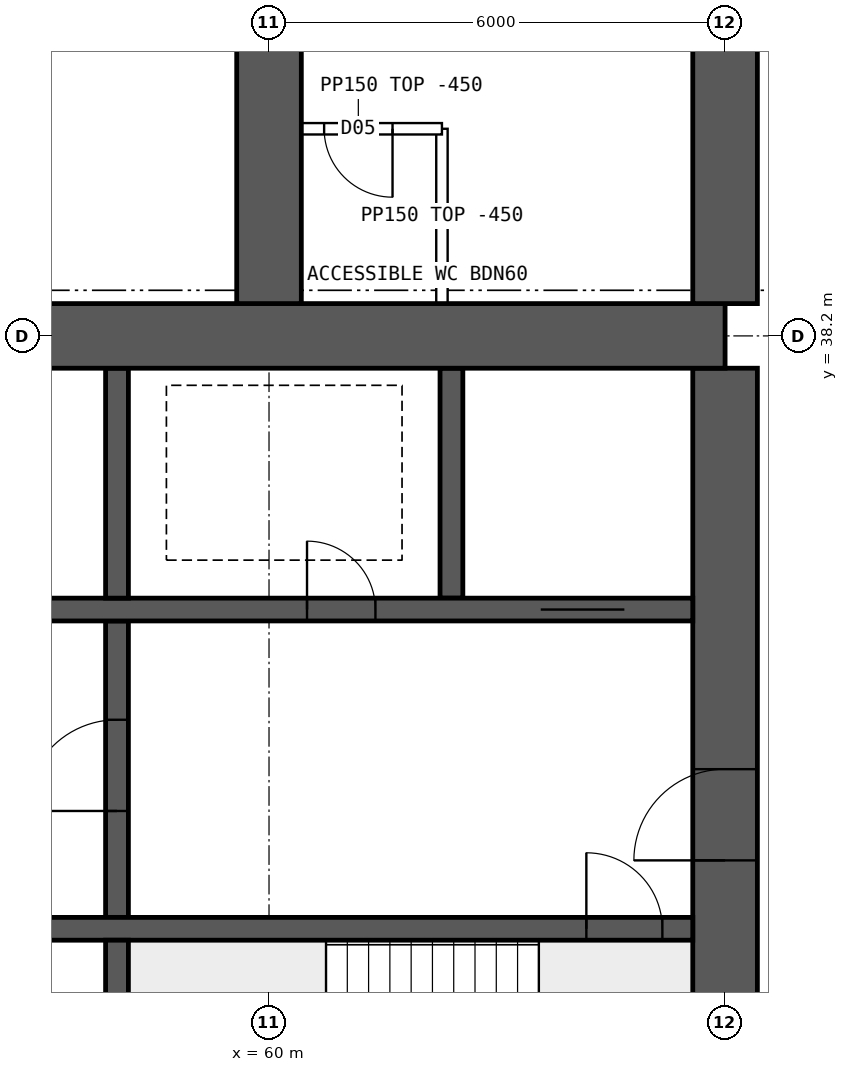
"""IFC4 building model, lengths in metres.
Left out: names, types, materials, properties, quantities, classifications, styles, units other than length and angle.
Written with IfcOpenShell. Run it as: python <this file> out.ifc"""

import sys

from ifc_helpers import new_model, si_unit, direction, frame, frame_2d, origin, place, context, subcontext, project, spatial, rectangle, extrude, element, fill, save


model = new_model("IFC4")
c1 = context("Model", 3, precision=1e-05, world=origin(), true_north=direction((0.0, 1.0)))
c2 = subcontext(c1, "Body", "Model", "MODEL_VIEW")
j1 = project(units=[si_unit("LENGTHUNIT", "METRE"), si_unit("PLANEANGLEUNIT", "RADIAN")], contexts=[c1])
p1 = place(None, origin())
s1 = spatial("IfcSite", under=j1, at=p1, CompositionType="ELEMENT")
p2 = place(p1, origin())
s2 = spatial("IfcBuilding", under=s1, at=p2, CompositionType="ELEMENT")
p3 = place(p2, frame((0.0, 0.0, 174.85)))
s3 = spatial("IfcBuildingStorey", under=s2, at=p3, CompositionType="ELEMENT", Elevation=174.85)
p4 = place(p3, frame((18.0, 38.2, 0.0), z_axis=(0.0, 0.0, 1.0), x_axis=(1.0, 0.0, 0.0)))
e1 = element("IfcWall", 1, at=p4, inside=s3, PredefinedType="SHEAR", context=c2, shape_type="SweptSolid", body=[
    extrude(rectangle(XDim=48.0, YDim=0.85, at=frame_2d((24.0, 0.0))), origin(), (0.0, 0.0, 1.0), 3.75),
])
p5 = place(p3, frame((66.0, 26.225, 0.0), z_axis=(0.0, 0.0, 1.0), x_axis=(0.0, 1.0, 0.0)))
e2 = element("IfcWall", 2, at=p5, inside=s3, PredefinedType="SHEAR", context=c2, shape_type="SweptSolid", body=[
    extrude(rectangle(XDim=11.55, YDim=0.85, at=frame_2d((5.775, 0.0))), origin(), (0.0, 0.0, 1.0), 3.75),
])
p6 = place(p5, frame((5.075, 0.0, 0.0)))
e3 = element("IfcOpeningElement", 3, at=p6, cuts=e2, PredefinedType="OPENING", context=c2, shape_type="SweptSolid", body=[
    extrude(rectangle(XDim=1.2, YDim=2.1, at=frame_2d((0.6, 1.05))), frame((0.0, 0.435, 0.0), z_axis=(0.0, -1.0, 0.0), x_axis=(1.0, 0.0, 0.0)), (0.0, 0.0, 1.0), 0.87),
])
p7 = place(p3, frame((18.425, 30.4, 0.0), z_axis=(0.0, 0.0, 1.0), x_axis=(1.0, 0.0, 0.0)))
e4 = element("IfcWall", 4, at=p7, inside=s3, PredefinedType="SHEAR", context=c2, shape_type="SweptSolid", body=[
    extrude(rectangle(XDim=47.15, YDim=0.3, at=frame_2d((23.575, 0.0))), origin(), (0.0, 0.0, 1.0), 3.75),
])
p8 = place(p7, frame((0.4, 0.0, 0.0)))
e5 = element("IfcOpeningElement", 5, at=p8, cuts=e4, PredefinedType="OPENING", context=c2, shape_type="SweptSolid", body=[
    extrude(rectangle(XDim=1.0, YDim=2.1, at=frame_2d((0.5, 1.05))), frame((0.0, 0.16, 0.0), z_axis=(0.0, -1.0, 0.0), x_axis=(1.0, 0.0, 0.0)), (0.0, 0.0, 1.0), 0.32),
])
p9 = place(p7, frame((45.75, 0.0, 0.0)))
e6 = element("IfcOpeningElement", 6, at=p9, cuts=e4, PredefinedType="OPENING", context=c2, shape_type="SweptSolid", body=[
    extrude(rectangle(XDim=1.0, YDim=2.1, at=frame_2d((0.5, 1.05))), frame((0.0, 0.16, 0.0), z_axis=(0.0, -1.0, 0.0), x_axis=(1.0, 0.0, 0.0)), (0.0, 0.0, 1.0), 0.32),
])
p10 = place(p7, frame((8.325, 0.0, 0.0)))
e7 = element("IfcOpeningElement", 7, at=p10, cuts=e4, PredefinedType="OPENING", context=c2, shape_type="SweptSolid", body=[
    extrude(rectangle(XDim=1.1, YDim=2.1, at=frame_2d((0.55, 1.05))), frame((0.0, 0.16, 0.0), z_axis=(0.0, -1.0, 0.0), x_axis=(1.0, 0.0, 0.0)), (0.0, 0.0, 1.0), 0.32),
])
p11 = place(p7, frame((10.925, 0.0, 0.0)))
e8 = element("IfcOpeningElement", 8, at=p11, cuts=e4, PredefinedType="OPENING", context=c2, shape_type="SweptSolid", body=[
    extrude(rectangle(XDim=1.1, YDim=2.1, at=frame_2d((0.55, 1.05))), frame((0.0, 0.16, 0.0), z_axis=(0.0, -1.0, 0.0), x_axis=(1.0, 0.0, 0.0)), (0.0, 0.0, 1.0), 0.32),
])
p12 = place(p7, frame((13.525, 0.0, 0.0)))
e9 = element("IfcOpeningElement", 9, at=p12, cuts=e4, PredefinedType="OPENING", context=c2, shape_type="SweptSolid", body=[
    extrude(rectangle(XDim=1.1, YDim=2.1, at=frame_2d((0.55, 1.05))), frame((0.0, 0.16, 0.0), z_axis=(0.0, -1.0, 0.0), x_axis=(1.0, 0.0, 0.0)), (0.0, 0.0, 1.0), 0.32),
])
p13 = place(p7, frame((16.125, 0.0, 0.0)))
e10 = element("IfcOpeningElement", 10, at=p13, cuts=e4, PredefinedType="OPENING", context=c2, shape_type="SweptSolid", body=[
    extrude(rectangle(XDim=1.1, YDim=2.1, at=frame_2d((0.55, 1.05))), frame((0.0, 0.16, 0.0), z_axis=(0.0, -1.0, 0.0), x_axis=(1.0, 0.0, 0.0)), (0.0, 0.0, 1.0), 0.32),
])
p14 = place(p7, frame((18.9, 0.0, 0.0)))
e11 = element("IfcOpeningElement", 11, at=p14, cuts=e4, PredefinedType="OPENING", context=c2, shape_type="SweptSolid", body=[
    extrude(rectangle(XDim=0.9, YDim=2.1, at=frame_2d((0.45, 1.05))), frame((0.0, 0.16, 0.0), z_axis=(0.0, -1.0, 0.0), x_axis=(1.0, 0.0, 0.0)), (0.0, 0.0, 1.0), 0.32),
])
p15 = place(p7, frame((30.192, 0.0, 0.0)))
e12 = element("IfcOpeningElement", 12, at=p15, cuts=e4, PredefinedType="OPENING", context=c2, shape_type="SweptSolid", body=[
    extrude(rectangle(XDim=1.1, YDim=2.1, at=frame_2d((0.55, 1.05))), frame((0.0, 0.16, 0.0), z_axis=(0.0, -1.0, 0.0), x_axis=(1.0, 0.0, 0.0)), (0.0, 0.0, 1.0), 0.32),
])
p16 = place(p7, frame((33.725, 0.0, 0.0)))
e13 = element("IfcOpeningElement", 13, at=p16, cuts=e4, PredefinedType="OPENING", context=c2, shape_type="SweptSolid", body=[
    extrude(rectangle(XDim=1.1, YDim=2.1, at=frame_2d((0.55, 1.05))), frame((0.0, 0.16, 0.0), z_axis=(0.0, -1.0, 0.0), x_axis=(1.0, 0.0, 0.0)), (0.0, 0.0, 1.0), 0.32),
])
p17 = place(p7, frame((37.258, 0.0, 0.0)))
e14 = element("IfcOpeningElement", 14, at=p17, cuts=e4, PredefinedType="OPENING", context=c2, shape_type="SweptSolid", body=[
    extrude(rectangle(XDim=1.1, YDim=2.1, at=frame_2d((0.55, 1.05))), frame((0.0, 0.16, 0.0), z_axis=(0.0, -1.0, 0.0), x_axis=(1.0, 0.0, 0.0)), (0.0, 0.0, 1.0), 0.32),
])
p18 = place(p3, frame((18.425, 34.6, 0.0), z_axis=(0.0, 0.0, 1.0), x_axis=(1.0, 0.0, 0.0)))
e15 = element("IfcWall", 15, at=p18, inside=s3, PredefinedType="SHEAR", context=c2, shape_type="SweptSolid", body=[
    extrude(rectangle(XDim=47.15, YDim=0.3, at=frame_2d((23.575, 0.0))), origin(), (0.0, 0.0, 1.0), 3.75),
])
p19 = place(p18, frame((0.9, 0.0, 0.0)))
e16 = element("IfcOpeningElement", 16, at=p19, cuts=e15, PredefinedType="OPENING", context=c2, shape_type="SweptSolid", body=[
    extrude(rectangle(XDim=1.1, YDim=2.1, at=frame_2d((0.55, 1.05))), frame((0.0, 0.16, 0.0), z_axis=(0.0, -1.0, 0.0), x_axis=(1.0, 0.0, 0.0)), (0.0, 0.0, 1.0), 0.32),
])
p20 = place(p18, frame((45.15, 0.0, 0.0)))
e17 = element("IfcOpeningElement", 17, at=p20, cuts=e15, PredefinedType="OPENING", context=c2, shape_type="SweptSolid", body=[
    extrude(rectangle(XDim=1.1, YDim=2.1, at=frame_2d((0.55, 1.05))), frame((0.0, 0.16, 0.0), z_axis=(0.0, -1.0, 0.0), x_axis=(1.0, 0.0, 0.0)), (0.0, 0.0, 1.0), 0.32),
])
p21 = place(p18, frame((4.175, 0.0, 0.0)))
e18 = element("IfcOpeningElement", 18, at=p21, cuts=e15, PredefinedType="OPENING", context=c2, shape_type="SweptSolid", body=[
    extrude(rectangle(XDim=0.9, YDim=2.1, at=frame_2d((0.45, 1.05))), frame((0.0, 0.16, 0.0), z_axis=(0.0, -1.0, 0.0), x_axis=(1.0, 0.0, 0.0)), (0.0, 0.0, 1.0), 0.32),
])
p22 = place(p18, frame((42.075, 0.0, 0.0)))
e19 = element("IfcOpeningElement", 19, at=p22, cuts=e15, PredefinedType="OPENING", context=c2, shape_type="SweptSolid", body=[
    extrude(rectangle(XDim=0.9, YDim=2.1, at=frame_2d((0.45, 1.05))), frame((0.0, 0.16, 0.0), z_axis=(0.0, -1.0, 0.0), x_axis=(1.0, 0.0, 0.0)), (0.0, 0.0, 1.0), 0.32),
])
p23 = place(p18, frame((8.95, 0.0, 0.0)))
e20 = element("IfcOpeningElement", 20, at=p23, cuts=e15, PredefinedType="OPENING", context=c2, shape_type="SweptSolid", body=[
    extrude(rectangle(XDim=0.9, YDim=2.1, at=frame_2d((0.45, 1.05))), frame((0.0, 0.16, 0.0), z_axis=(0.0, -1.0, 0.0), x_axis=(1.0, 0.0, 0.0)), (0.0, 0.0, 1.0), 0.32),
])
p24 = place(p18, frame((12.924, 0.0, 0.0)))
e21 = element("IfcOpeningElement", 21, at=p24, cuts=e15, PredefinedType="OPENING", context=c2, shape_type="SweptSolid", body=[
    extrude(rectangle(XDim=0.9, YDim=2.1, at=frame_2d((0.45, 1.05))), frame((0.0, 0.16, 0.0), z_axis=(0.0, -1.0, 0.0), x_axis=(1.0, 0.0, 0.0)), (0.0, 0.0, 1.0), 0.32),
])
p25 = place(p18, frame((16.571, 0.0, 0.0)))
e22 = element("IfcOpeningElement", 22, at=p25, cuts=e15, PredefinedType="OPENING", context=c2, shape_type="SweptSolid", body=[
    extrude(rectangle(XDim=0.9, YDim=2.1, at=frame_2d((0.45, 1.05))), frame((0.0, 0.16, 0.0), z_axis=(0.0, -1.0, 0.0), x_axis=(1.0, 0.0, 0.0)), (0.0, 0.0, 1.0), 0.32),
])
p26 = place(p18, frame((20.33, 0.0, 0.0)))
e23 = element("IfcOpeningElement", 23, at=p26, cuts=e15, PredefinedType="OPENING", context=c2, shape_type="SweptSolid", body=[
    extrude(rectangle(XDim=0.9, YDim=2.1, at=frame_2d((0.45, 1.05))), frame((0.0, 0.16, 0.0), z_axis=(0.0, -1.0, 0.0), x_axis=(1.0, 0.0, 0.0)), (0.0, 0.0, 1.0), 0.32),
])
p27 = place(p18, frame((24.736, 0.0, 0.0)))
e24 = element("IfcOpeningElement", 24, at=p27, cuts=e15, PredefinedType="OPENING", context=c2, shape_type="SweptSolid", body=[
    extrude(rectangle(XDim=0.9, YDim=2.1, at=frame_2d((0.45, 1.05))), frame((0.0, 0.16, 0.0), z_axis=(0.0, -1.0, 0.0), x_axis=(1.0, 0.0, 0.0)), (0.0, 0.0, 1.0), 0.32),
])
p28 = place(p18, frame((27.533, 0.0, 0.0)))
e25 = element("IfcOpeningElement", 25, at=p28, cuts=e15, PredefinedType="OPENING", context=c2, shape_type="SweptSolid", body=[
    extrude(rectangle(XDim=0.9, YDim=2.1, at=frame_2d((0.45, 1.05))), frame((0.0, 0.16, 0.0), z_axis=(0.0, -1.0, 0.0), x_axis=(1.0, 0.0, 0.0)), (0.0, 0.0, 1.0), 0.32),
])
p29 = place(p18, frame((29.5, 0.0, 0.0)))
e26 = element("IfcOpeningElement", 26, at=p29, cuts=e15, PredefinedType="OPENING", context=c2, shape_type="SweptSolid", body=[
    extrude(rectangle(XDim=0.9, YDim=2.1, at=frame_2d((0.45, 1.05))), frame((0.0, 0.16, 0.0), z_axis=(0.0, -1.0, 0.0), x_axis=(1.0, 0.0, 0.0)), (0.0, 0.0, 1.0), 0.32),
])
p30 = place(p18, frame((31.932, 0.0, 0.0)))
e27 = element("IfcOpeningElement", 27, at=p30, cuts=e15, PredefinedType="OPENING", context=c2, shape_type="SweptSolid", body=[
    extrude(rectangle(XDim=0.9, YDim=2.1, at=frame_2d((0.45, 1.05))), frame((0.0, 0.16, 0.0), z_axis=(0.0, -1.0, 0.0), x_axis=(1.0, 0.0, 0.0)), (0.0, 0.0, 1.0), 0.32),
])
p31 = place(p18, frame((34.667, 0.0, 0.0)))
e28 = element("IfcOpeningElement", 28, at=p31, cuts=e15, PredefinedType="OPENING", context=c2, shape_type="SweptSolid", body=[
    extrude(rectangle(XDim=0.9, YDim=2.1, at=frame_2d((0.45, 1.05))), frame((0.0, 0.16, 0.0), z_axis=(0.0, -1.0, 0.0), x_axis=(1.0, 0.0, 0.0)), (0.0, 0.0, 1.0), 0.32),
])
p32 = place(p18, frame((37.707, 0.0, 0.0)))
e29 = element("IfcOpeningElement", 29, at=p32, cuts=e15, PredefinedType="OPENING", context=c2, shape_type="SweptSolid", body=[
    extrude(rectangle(XDim=0.9, YDim=2.1, at=frame_2d((0.45, 1.05))), frame((0.0, 0.16, 0.0), z_axis=(0.0, -1.0, 0.0), x_axis=(1.0, 0.0, 0.0)), (0.0, 0.0, 1.0), 0.32),
])
p33 = place(p3, frame((58.0, 26.225, 0.0), z_axis=(0.0, 0.0, 1.0), x_axis=(0.0, 1.0, 0.0)))
e30 = element("IfcWall", 30, at=p33, inside=s3, PredefinedType="SHEAR", context=c2, shape_type="SweptSolid", body=[
    extrude(rectangle(XDim=4.025, YDim=0.3, at=frame_2d((2.012, 0.0))), origin(), (0.0, 0.0, 1.0), 3.75),
])
p34 = place(p3, frame((58.0, 30.55, 0.0), z_axis=(0.0, 0.0, 1.0), x_axis=(0.0, 1.0, 0.0)))
e31 = element("IfcWall", 31, at=p34, inside=s3, PredefinedType="SHEAR", context=c2, shape_type="SweptSolid", body=[
    extrude(rectangle(XDim=3.9, YDim=0.3, at=frame_2d((1.95, 0.0))), origin(), (0.0, 0.0, 1.0), 3.75),
])
p35 = place(p34, frame((1.4, 0.0, 0.0)))
e32 = element("IfcOpeningElement", 32, at=p35, cuts=e31, PredefinedType="OPENING", context=c2, shape_type="SweptSolid", body=[
    extrude(rectangle(XDim=1.2, YDim=2.1, at=frame_2d((0.6, 1.05))), frame((0.0, 0.16, 0.0), z_axis=(0.0, -1.0, 0.0), x_axis=(1.0, 0.0, 0.0)), (0.0, 0.0, 1.0), 0.32),
])
for number, where, z_axis, x_axis in (
    (33, (62.4, 34.75, 0.0), (0.0, 0.0, 1.0), (0.0, 1.0, 0.0)),
    (34, (58.0, 34.75, 0.0), (0.0, 0.0, 1.0), (0.0, 1.0, 0.0)),
):
    element("IfcWall", number, at=place(p3, frame(where, z_axis=z_axis, x_axis=x_axis)), inside=s3, PredefinedType="SHEAR", context=c2, shape_type="SweptSolid", body=[
        extrude(rectangle(XDim=3.025, YDim=0.3, at=frame_2d((1.512, 0.0))), origin(), (0.0, 0.0, 1.0), 3.75),
    ])
for number, where, z_axis, x_axis in (
    (35, (60.0, 38.625, 0.0), (0.0, 0.0, 1.0), (0.0, 1.0, 0.0)),
    (36, (66.0, 38.625, 0.0), (0.0, 0.0, 1.0), (0.0, 1.0, 0.0)),
):
    element("IfcWall", number, at=place(p3, frame(where, z_axis=z_axis, x_axis=x_axis)), inside=s3, PredefinedType="SHEAR", context=c2, shape_type="SweptSolid", body=[
        extrude(rectangle(XDim=8.175, YDim=0.85, at=frame_2d((4.087, 0.0))), origin(), (0.0, 0.0, 1.0), 3.75),
    ])
p36 = place(p3, frame((62.275, 40.925, 0.0), z_axis=(0.0, 0.0, 1.0), x_axis=(0.0, -1.0, 0.0)))
e37 = element("IfcWall", 37, at=p36, inside=s3, PredefinedType="PARTITIONING", context=c2, shape_type="SweptSolid", body=[
    extrude(rectangle(XDim=2.3, YDim=0.15, at=frame_2d((1.15, 0.0))), origin(), (0.0, 0.0, 1.0), 3.3),
])
p37 = place(p3, frame((62.275, 40.925, 0.0), z_axis=(0.0, 0.0, 1.0), x_axis=(-1.0, 0.0, 0.0)))
e38 = element("IfcWall", 38, at=p37, inside=s3, PredefinedType="PARTITIONING", context=c2, shape_type="SweptSolid", body=[
    extrude(rectangle(XDim=2.2, YDim=0.15, at=frame_2d((1.1, 0.0))), origin(), (0.0, 0.0, 1.0), 3.3),
])
p38 = place(p37, frame((0.65, 0.0, 0.0)))
e39 = element("IfcOpeningElement", 39, at=p38, cuts=e38, PredefinedType="OPENING", context=c2, shape_type="SweptSolid", body=[
    extrude(rectangle(XDim=0.9, YDim=2.1, at=frame_2d((0.45, 1.05))), frame((0.0, 0.085, 0.0), z_axis=(0.0, -1.0, 0.0), x_axis=(1.0, 0.0, 0.0)), (0.0, 0.0, 1.0), 0.17),
])
p39 = place(p6, origin())
e40 = element("IfcDoor", 40, at=p39, inside=s3, OperationType="SINGLE_SWING_LEFT", PredefinedType="DOOR", context=c2, shape_type="SweptSolid", body=[
    extrude(rectangle(XDim=1.2, YDim=2.1, at=frame_2d((0.6, 1.05))), frame((0.0, 0.025, 0.0), z_axis=(0.0, -1.0, 0.0), x_axis=(1.0, 0.0, 0.0)), (0.0, 0.0, 1.0), 0.05),
])
fill(e3, e40)
p40 = place(p9, origin())
e41 = element("IfcDoor", 41, at=p40, inside=s3, OperationType="SINGLE_SWING_LEFT", PredefinedType="DOOR", context=c2, shape_type="SweptSolid", body=[
    extrude(rectangle(XDim=1.0, YDim=2.1, at=frame_2d((0.5, 1.05))), frame((0.0, 0.025, 0.0), z_axis=(0.0, -1.0, 0.0), x_axis=(1.0, 0.0, 0.0)), (0.0, 0.0, 1.0), 0.05),
])
fill(e6, e41)
p41 = place(p20, origin())
e42 = element("IfcDoor", 42, at=p41, inside=s3, OperationType="DOUBLE_DOOR_SLIDING", PredefinedType="DOOR", context=c2, shape_type="SweptSolid", body=[
    extrude(rectangle(XDim=1.1, YDim=2.1, at=frame_2d((0.55, 1.05))), frame((0.0, 0.025, 0.0), z_axis=(0.0, -1.0, 0.0), x_axis=(1.0, 0.0, 0.0)), (0.0, 0.0, 1.0), 0.05),
])
fill(e17, e42)
p42 = place(p22, origin())
e43 = element("IfcDoor", 43, at=p42, inside=s3, OperationType="SINGLE_SWING_LEFT", PredefinedType="DOOR", context=c2, shape_type="SweptSolid", body=[
    extrude(rectangle(XDim=0.9, YDim=2.1, at=frame_2d((0.45, 1.05))), frame((0.0, 0.025, 0.0), z_axis=(0.0, -1.0, 0.0), x_axis=(1.0, 0.0, 0.0)), (0.0, 0.0, 1.0), 0.05),
])
fill(e19, e43)
p43 = place(p35, origin())
e44 = element("IfcDoor", 44, at=p43, inside=s3, OperationType="SINGLE_SWING_LEFT", PredefinedType="DOOR", context=c2, shape_type="SweptSolid", body=[
    extrude(rectangle(XDim=1.2, YDim=2.1, at=frame_2d((0.6, 1.05))), frame((0.0, 0.025, 0.0), z_axis=(0.0, -1.0, 0.0), x_axis=(1.0, 0.0, 0.0)), (0.0, 0.0, 1.0), 0.05),
])
fill(e32, e44)
p44 = place(p38, origin())
e45 = element("IfcDoor", 45, at=p44, inside=s3, OperationType="SINGLE_SWING_LEFT", PredefinedType="DOOR", context=c2, shape_type="SweptSolid", body=[
    extrude(rectangle(XDim=0.9, YDim=2.1, at=frame_2d((0.45, 1.05))), frame((0.0, 0.025, 0.0), z_axis=(0.0, -1.0, 0.0), x_axis=(1.0, 0.0, 0.0)), (0.0, 0.0, 1.0), 0.05),
])
fill(e39, e45)
save(model, sys.argv[1])
